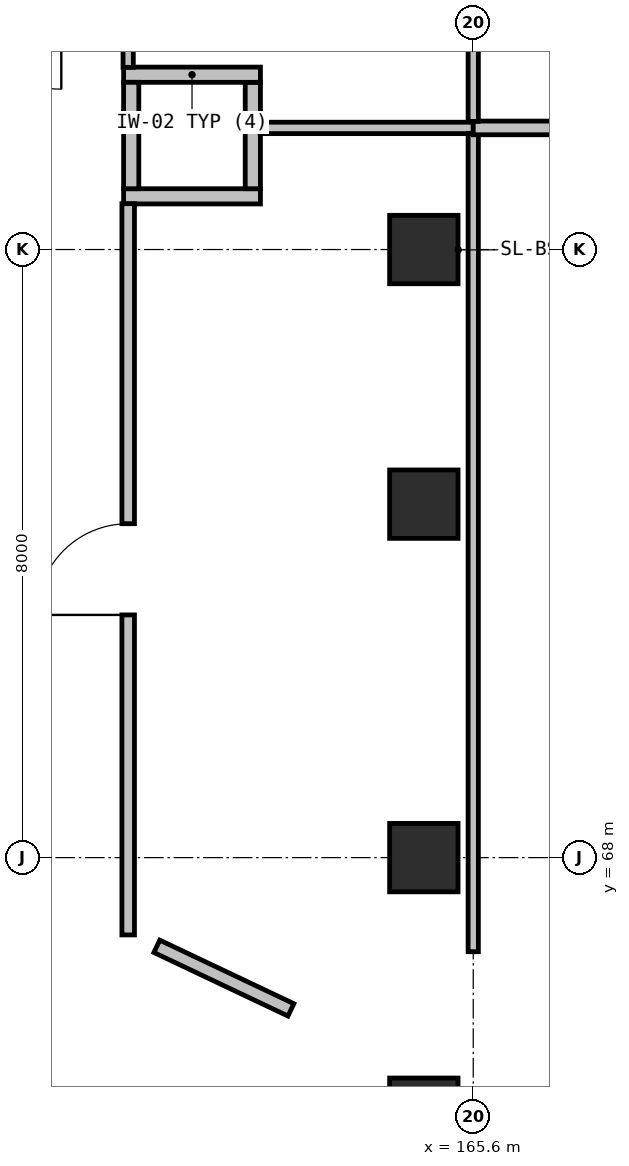
"""IFC4 building model, lengths in metres.
Left out: names, types, materials, properties, quantities, classifications, styles, units other than length and angle.
Written with IfcOpenShell. Run it as: python <this file> out.ifc"""

import sys

from ifc_helpers import new_model, si_unit, direction, frame, frame_2d, origin, origin_2d, place, context, subcontext, project, spatial, rectangle, extrude, element, fill, save


model = new_model("IFC4")
c1 = context("Model", 3, precision=1e-05, world=origin(), true_north=direction((0.0, 1.0)))
c2 = subcontext(c1, "Body", "Model", "MODEL_VIEW")
j1 = project(units=[si_unit("LENGTHUNIT", "METRE"), si_unit("PLANEANGLEUNIT", "RADIAN")], contexts=[c1])
p1 = place(None, origin())
s1 = spatial("IfcSite", under=j1, at=p1, CompositionType="ELEMENT")
p2 = place(p1, origin())
s2 = spatial("IfcBuilding", under=s1, at=p2, CompositionType="ELEMENT")
p3 = place(p2, frame((0.0, 0.0, -4.8)))
s3 = spatial("IfcBuildingStorey", under=s2, at=p3, CompositionType="ELEMENT", Elevation=-4.8)
for number, where, z_axis, x_axis in (
    (1, (164.95, 64.65, 0.0), (0.0, 0.0, 1.0), (1.0, 0.0, 0.0)),
    (2, (164.95, 68.0, 0.0), (0.0, 0.0, 1.0), (1.0, 0.0, 0.0)),
    (3, (164.95, 72.65, 0.0), (0.0, 0.0, 1.0), (1.0, 0.0, 0.0)),
    (4, (164.95, 76.0, 0.0), (0.0, 0.0, 1.0), (1.0, 0.0, 0.0)),
):
    element("IfcColumn", number, at=place(p3, frame(where, z_axis=z_axis, x_axis=x_axis)), inside=s3, PredefinedType="COLUMN", context=c2, shape_type="SweptSolid", body=[
        extrude(rectangle(XDim=0.9, YDim=0.9, at=origin_2d()), origin(), (0.0, 0.0, 1.0), 4.8),
    ])
p4 = place(p3, frame((161.0, 76.7, 0.0), z_axis=(0.0, 0.0, 1.0), x_axis=(1.0, 0.0, 0.0)))
e5 = element("IfcWall", 5, at=p4, inside=s3, PredefinedType="SOLIDWALL", context=c2, shape_type="SweptSolid", body=[
    extrude(rectangle(XDim=1.8, YDim=0.2, at=frame_2d((0.9, 0.0))), origin(), (0.0, 0.0, 1.0), 4.45),
])
p5 = place(p3, frame((162.7, 76.8, 0.0), z_axis=(0.0, 0.0, 1.0), x_axis=(0.0, 1.0, 0.0)))
e6 = element("IfcWall", 6, at=p5, inside=s3, PredefinedType="SOLIDWALL", context=c2, shape_type="SweptSolid", body=[
    extrude(rectangle(XDim=1.4, YDim=0.2, at=frame_2d((0.7, 0.0))), origin(), (0.0, 0.0, 1.0), 4.45),
])
p6 = place(p3, frame((162.8, 78.3, 0.0), z_axis=(0.0, 0.0, 1.0), x_axis=(-1.0, 0.0, 0.0)))
e7 = element("IfcWall", 7, at=p6, inside=s3, PredefinedType="SOLIDWALL", context=c2, shape_type="SweptSolid", body=[
    extrude(rectangle(XDim=1.8, YDim=0.2, at=frame_2d((0.9, 0.0))), origin(), (0.0, 0.0, 1.0), 4.45),
])
p7 = place(p3, frame((161.1, 78.2, 0.0), z_axis=(0.0, 0.0, 1.0), x_axis=(0.0, -1.0, 0.0)))
e8 = element("IfcWall", 8, at=p7, inside=s3, PredefinedType="SOLIDWALL", context=c2, shape_type="SweptSolid", body=[
    extrude(rectangle(XDim=1.4, YDim=0.2, at=frame_2d((0.7, 0.0))), origin(), (0.0, 0.0, 1.0), 4.45),
])
p8 = place(p3, frame((163.201, 65.997, 0.0), z_axis=(0.0, 0.0, 1.0), x_axis=(-0.903658874167, 0.428253008325, 0.0)))
e9 = element("IfcWall", 9, at=p8, inside=s3, PredefinedType="PARTITIONING", context=c2, shape_type="SweptSolid", body=[
    extrude(rectangle(XDim=1.952, YDim=0.18, at=frame_2d((0.976, 0.0))), origin(), (0.0, 0.0, 1.0), 4.45),
])
p9 = place(p3, frame((161.06, 66.983, 0.0), z_axis=(0.0, 0.0, 1.0), x_axis=(0.0, 1.0, 0.0)))
e10 = element("IfcWall", 10, at=p9, inside=s3, PredefinedType="PARTITIONING", context=c2, shape_type="SweptSolid", body=[
    extrude(rectangle(XDim=9.62, YDim=0.165, at=frame_2d((4.81, 0.0))), origin(), (0.0, 0.0, 1.0), 4.45),
])
p10 = place(p9, frame((4.21, 0.0, 0.0)))
e11 = element("IfcOpeningElement", 11, at=p10, cuts=e10, PredefinedType="OPENING", context=c2, shape_type="SweptSolid", body=[
    extrude(rectangle(XDim=1.2, YDim=2.15, at=frame_2d((0.6, 1.075))), frame((0.0, 0.093, 0.0), z_axis=(0.0, -1.0, 0.0), x_axis=(1.0, 0.0, 0.0)), (0.0, 0.0, 1.0), 0.185),
])
p11 = place(p3, frame((162.797, 77.6, 0.0), z_axis=(0.0, 0.0, 1.0), x_axis=(1.0, 0.0, 0.0)))
e12 = element("IfcWall", 12, at=p11, inside=s3, PredefinedType="PARTITIONING", context=c2, shape_type="SweptSolid", body=[
    extrude(rectangle(XDim=2.803, YDim=0.15, at=frame_2d((1.401, 0.0))), origin(), (0.0, 0.0, 1.0), 4.45),
])
p12 = place(p3, frame((165.6, 77.529, 0.0), z_axis=(0.0, 0.0, 1.0), x_axis=(0.0, -1.0, 0.0)))
e13 = element("IfcWall", 13, at=p12, inside=s3, PredefinedType="PARTITIONING", context=c2, shape_type="SweptSolid", body=[
    extrude(rectangle(XDim=10.767, YDim=0.135, at=frame_2d((5.384, 0.0))), origin(), (0.0, 0.0, 1.0), 4.45),
])
p13 = place(p3, frame((165.6, 77.6, 0.0), z_axis=(0.0, 0.0, 1.0), x_axis=(1.0, 0.0, 0.0)))
e14 = element("IfcWall", 14, at=p13, inside=s3, PredefinedType="PARTITIONING", context=c2, shape_type="SweptSolid", body=[
    extrude(rectangle(XDim=8.4, YDim=0.18, at=frame_2d((4.2, 0.0))), origin(), (0.0, 0.0, 1.0), 4.45),
])
p14 = place(p3, frame((161.06, 78.397, 0.0), z_axis=(0.0, 0.0, 1.0), x_axis=(0.0, 1.0, 0.0)))
e15 = element("IfcWall", 15, at=p14, inside=s3, PredefinedType="PARTITIONING", context=c2, shape_type="SweptSolid", body=[
    extrude(rectangle(XDim=1.103, YDim=0.135, at=frame_2d((0.552, 0.0))), origin(), (0.0, 0.0, 1.0), 4.45),
])
p15 = place(p3, frame((165.6, 80.893, 0.0), z_axis=(0.0, 0.0, 1.0), x_axis=(0.0, -1.0, 0.0)))
e16 = element("IfcWall", 16, at=p15, inside=s3, PredefinedType="PARTITIONING", context=c2, shape_type="SweptSolid", body=[
    extrude(rectangle(XDim=3.207, YDim=0.135, at=frame_2d((1.604, 0.0))), origin(), (0.0, 0.0, 1.0), 4.45),
])
p16 = place(p10, origin())
e17 = element("IfcDoor", 17, at=p16, inside=s3, OperationType="SINGLE_SWING_LEFT", PredefinedType="DOOR", context=c2, shape_type="SweptSolid", body=[
    extrude(rectangle(XDim=1.2, YDim=2.15, at=frame_2d((0.6, 1.075))), frame((0.0, 0.025, 0.0), z_axis=(0.0, -1.0, 0.0), x_axis=(1.0, 0.0, 0.0)), (0.0, 0.0, 1.0), 0.05),
])
fill(e11, e17)
save(model, sys.argv[1])
